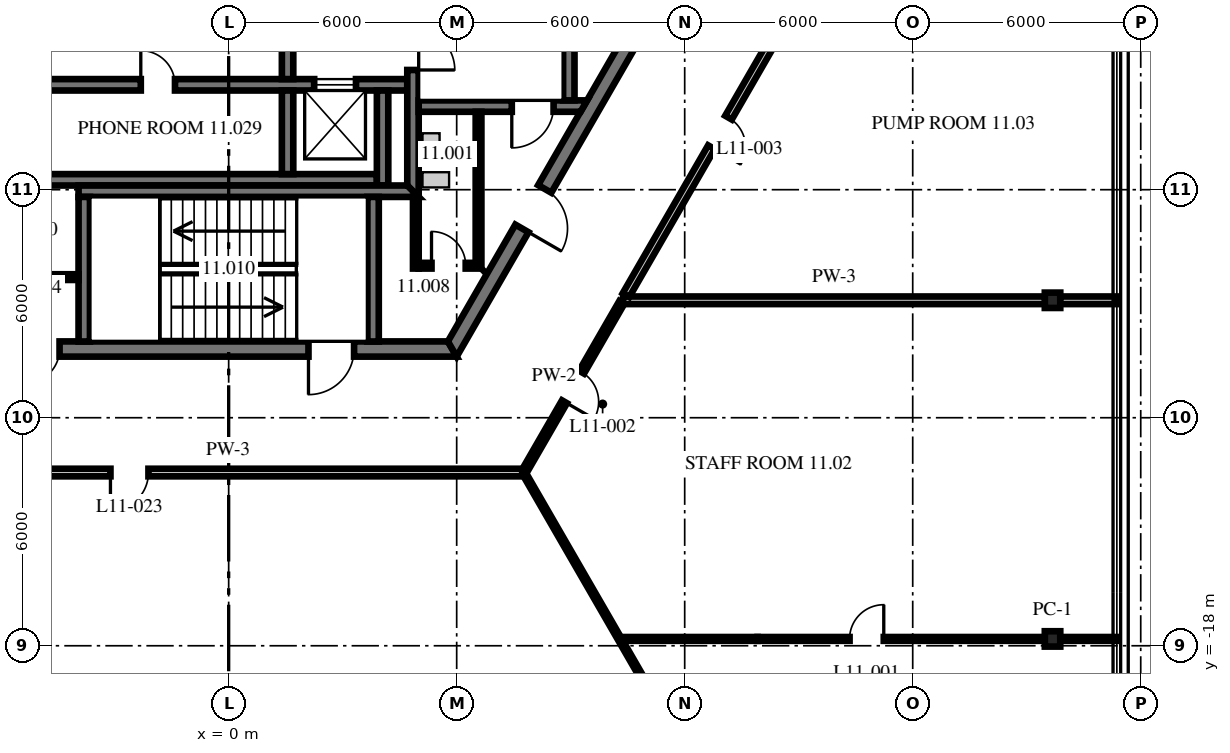
"""IFC4 building model, lengths in metres.
Left out: names, types, materials, properties, quantities, classifications, styles, units other than length and angle.
Written with IfcOpenShell. Run it as: python <this file> out.ifc"""

import sys

from ifc_helpers import new_model, si_unit, direction, frame, frame_2d, origin, origin_2d, place, context, subcontext, project, spatial, polyline, rectangle, i_section, outline, extrude, source, transform, mapped, element, fill, save


model = new_model("IFC4")
c1 = context("Model", 3, precision=1e-05, world=origin(), true_north=direction((0.0, 1.0)))
c2 = subcontext(c1, "Body", "Model", "MODEL_VIEW")
j1 = project(units=[si_unit("LENGTHUNIT", "METRE"), si_unit("PLANEANGLEUNIT", "RADIAN")], contexts=[c1])
p1 = place(None, origin())
s1 = spatial("IfcSite", under=j1, at=p1, CompositionType="ELEMENT")
p2 = place(p1, origin())
s2 = spatial("IfcBuilding", under=s1, at=p2, CompositionType="ELEMENT")
p3 = place(p2, frame((0.0, 0.0, 50.4)))
s3 = spatial("IfcBuildingStorey", under=s2, at=p3, CompositionType="ELEMENT", Elevation=50.4)
m1 = source(origin(), c2, "Body", "SweptSolid", [
    extrude(i_section(OverallWidth=0.404, OverallDepth=0.406, WebThickness=0.027, FlangeThickness=0.044, at=origin_2d()), origin(), (0.0, 0.0, 1.0), 3.15),
])
for number, where, z_axis, x_axis in (
    (1, (21.679, -17.82, 0.0), (0.0, 0.0, 1.0), (0.0, 1.0, 0.0)),
    (2, (21.679, -8.91, 0.0), (0.0, 0.0, 1.0), (0.0, 1.0, 0.0)),
):
    element("IfcColumn", number, at=place(p3, frame(where, z_axis=z_axis, x_axis=x_axis)), inside=s3, PredefinedType="COLUMN", context=c2, shape_type="MappedRepresentation", body=[
        mapped(m1, transform((0.0, 0.0, 0.0), scale=1.0)),
    ])
m2 = source(origin(), c2, "Body", "SweptSolid", [
    extrude(outline(polyline([(-0.115, -0.2), (11.885, -0.2), (11.654, 0.2), (0.115, 0.2), (-0.115, -0.2)])), origin(), (0.0, 0.0, 1.0), 4.05),
])
p4 = place(p3, frame((-5.885, -10.192, 0.0), z_axis=(0.0, 0.0, 1.0), x_axis=(1.0, 0.0, 0.0)))
e3 = element("IfcWall", 3, at=p4, inside=s3, PredefinedType="SHEAR", context=c2, shape_type="MappedRepresentation", body=[
    mapped(m2, transform((0.0, 0.0, 0.0), scale=1.0)),
])
p5 = place(p4, frame((7.985, 0.0, 0.0)))
e4 = element("IfcOpeningElement", 4, at=p5, cuts=e3, PredefinedType="OPENING", context=c2, shape_type="SweptSolid", body=[
    extrude(rectangle(XDim=1.2, YDim=2.1, at=frame_2d((0.6, 1.05))), frame((0.0, 0.21, 0.0), z_axis=(0.0, -1.0, 0.0), x_axis=(1.0, 0.0, 0.0)), (0.0, 0.0, 1.0), 0.42),
])
p6 = place(p4, frame((0.534, 0.0, 0.0)))
e5 = element("IfcOpeningElement", 5, at=p6, cuts=e3, PredefinedType="OPENING", context=c2, shape_type="SweptSolid", body=[
    extrude(rectangle(XDim=0.9, YDim=2.1, at=frame_2d((0.45, 1.05))), frame((0.0, 0.21, 0.0), z_axis=(0.0, -1.0, 0.0), x_axis=(1.0, 0.0, 0.0)), (0.0, 0.0, 1.0), 0.42),
])
p7 = place(p3, frame((5.885, -10.192, 0.0), z_axis=(0.0, 0.0, 1.0), x_axis=(0.499996592174, 0.866027371285, 0.0)))
e6 = element("IfcWall", 6, at=p7, inside=s3, PredefinedType="SHEAR", context=c2, shape_type="MappedRepresentation", body=[
    mapped(m2, transform((0.0, 0.0, 0.0), scale=1.0)),
])
p8 = place(p7, frame((3.665, 0.0, 0.0)))
e7 = element("IfcOpeningElement", 7, at=p8, cuts=e6, PredefinedType="OPENING", context=c2, shape_type="SweptSolid", body=[
    extrude(rectangle(XDim=1.2, YDim=2.1, at=frame_2d((0.6, 1.05))), frame((0.0, 0.21, 0.0), z_axis=(0.0, -1.0, 0.0), x_axis=(1.0, 0.0, 0.0)), (0.0, 0.0, 1.0), 0.42),
])
p9 = place(p3, frame((-8.1, -3.24, 0.0), z_axis=(0.0, 0.0, 1.0), x_axis=(1.0, 0.0, 0.0)))
e8 = element("IfcWall", 8, at=p9, inside=s3, PredefinedType="SHEAR", context=c2, shape_type="SweptSolid", body=[
    extrude(rectangle(XDim=12.8, YDim=0.3, at=frame_2d((6.4, 0.0))), origin(), (0.0, 0.0, 1.0), 4.05),
])
p10 = place(p9, frame((1.113, 0.0, 0.0)))
e9 = element("IfcOpeningElement", 9, at=p10, cuts=e8, PredefinedType="OPENING", context=c2, shape_type="SweptSolid", body=[
    extrude(rectangle(XDim=0.9, YDim=2.1, at=frame_2d((0.45, 1.05))), frame((0.0, 0.16, 0.0), z_axis=(0.0, -1.0, 0.0), x_axis=(1.0, 0.0, 0.0)), (0.0, 0.0, 1.0), 0.32),
])
p11 = place(p9, frame((5.788, 0.0, 0.0)))
e10 = element("IfcOpeningElement", 10, at=p11, cuts=e8, PredefinedType="OPENING", context=c2, shape_type="SweptSolid", body=[
    extrude(rectangle(XDim=0.9, YDim=2.1, at=frame_2d((0.45, 1.05))), frame((0.0, 0.16, 0.0), z_axis=(0.0, -1.0, 0.0), x_axis=(1.0, 0.0, 0.0)), (0.0, 0.0, 1.0), 0.32),
])
p12 = place(p9, frame((10.35, 0.0, 0.0)))
e11 = element("IfcOpeningElement", 11, at=p12, cuts=e8, PredefinedType="OPENING", context=c2, shape_type="SweptSolid", body=[
    extrude(rectangle(XDim=1.1, YDim=2.1, at=frame_2d((0.55, 1.05))), frame((0.0, 0.16, 0.0), z_axis=(0.0, -1.0, 0.0), x_axis=(1.0, 0.0, 0.0)), (0.0, 0.0, 1.0), 0.32),
])
p13 = place(p3, frame((-8.1, -5.74, 0.0), z_axis=(0.0, 0.0, 1.0), x_axis=(1.0, 0.0, 0.0)))
e12 = element("IfcWall", 12, at=p13, inside=s3, PredefinedType="SHEAR", context=c2, shape_type="SweptSolid", body=[
    extrude(outline(polyline([(12.0, -0.15), (-0.04, -0.15), (-0.213, 0.15), (12.0, 0.15), (12.0, -0.15)])), origin(), (0.0, 0.0, 1.0), 4.05),
])
m3 = source(origin(), c2, "Body", "SweptSolid", [
    extrude(rectangle(XDim=2.2, YDim=0.3, at=frame_2d((1.1, 0.0))), origin(), (0.0, 0.0, 1.0), 4.05),
])
p14 = place(p3, frame((1.55, -5.59, 0.0), z_axis=(0.0, 0.0, 1.0), x_axis=(0.0, 1.0, 0.0)))
e13 = element("IfcWall", 13, at=p14, inside=s3, PredefinedType="SHEAR", context=c2, shape_type="MappedRepresentation", body=[
    mapped(m3, transform((0.0, 0.0, 0.0), scale=1.0)),
])
m4 = source(origin(), c2, "Body", "SweptSolid", [
    extrude(rectangle(XDim=2.5, YDim=0.3, at=frame_2d((1.25, 0.0))), origin(), (0.0, 0.0, 1.0), 4.05),
])
p15 = place(p3, frame((4.05, -5.89, 0.0), z_axis=(0.0, 0.0, 1.0), x_axis=(0.0, 1.0, 0.0)))
e14 = element("IfcWall", 14, at=p15, inside=s3, PredefinedType="SHEAR", context=c2, shape_type="MappedRepresentation", body=[
    mapped(m4, transform((0.0, 0.0, 0.0), scale=1.0)),
])
m5 = source(origin(), c2, "Body", "SweptSolid", [
    extrude(rectangle(XDim=3.0, YDim=0.3, at=frame_2d((1.5, 0.0))), origin(), (0.0, 0.0, 1.0), 4.05),
])
p16 = place(p3, frame((1.55, -3.09, 0.0), z_axis=(0.0, 0.0, 1.0), x_axis=(0.0, 1.0, 0.0)))
e15 = element("IfcWall", 15, at=p16, inside=s3, PredefinedType="SHEAR", context=c2, shape_type="MappedRepresentation", body=[
    mapped(m5, transform((0.0, 0.0, 0.0), scale=1.0)),
])
p17 = place(p16, frame((0.9, 0.0, 0.0)))
e16 = element("IfcOpeningElement", 16, at=p17, cuts=e15, PredefinedType="OPENING", context=c2, shape_type="SweptSolid", body=[
    extrude(rectangle(XDim=1.2, YDim=2.1, at=frame_2d((0.6, 1.05))), frame((0.0, 0.16, 0.0), z_axis=(0.0, -1.0, 0.0), x_axis=(1.0, 0.0, 0.0)), (0.0, 0.0, 1.0), 0.32),
])
p18 = place(p3, frame((4.85, -6.04, 0.0), z_axis=(0.0, 0.0, 1.0), x_axis=(0.0, 1.0, 0.0)))
e17 = element("IfcWall", 17, at=p18, inside=s3, PredefinedType="SHEAR", context=c2, shape_type="SweptSolid", body=[
    extrude(outline(polyline([(-0.15, -0.15), (9.99, -0.15), (9.99, 0.15), (0.15, 0.15), (-0.15, -0.15)])), origin(), (0.0, 0.0, 1.0), 4.05),
])
p19 = place(p18, frame((3.19, 0.0, 0.0)))
e18 = element("IfcOpeningElement", 18, at=p19, cuts=e17, PredefinedType="OPENING", context=c2, shape_type="SweptSolid", body=[
    extrude(rectangle(XDim=1.1, YDim=2.1, at=frame_2d((0.55, 1.05))), frame((0.0, 0.16, 0.0), z_axis=(0.0, -1.0, 0.0), x_axis=(1.0, 0.0, 0.0)), (0.0, 0.0, 1.0), 0.32),
])
p20 = place(p3, frame((5.0, -3.8, 0.0), z_axis=(0.0, 0.0, 1.0), x_axis=(1.0, 0.0, 0.0)))
e19 = element("IfcWall", 19, at=p20, inside=s3, PredefinedType="SHEAR", context=c2, shape_type="SweptSolid", body=[
    extrude(outline(polyline([(0.0, -0.15), (0.0, 0.15), (4.433, 0.15), (4.26, -0.15), (0.0, -0.15)])), origin(), (0.0, 0.0, 1.0), 4.05),
])
p21 = place(p20, frame((2.45, 0.0, 0.0)))
e20 = element("IfcOpeningElement", 20, at=p21, cuts=e19, PredefinedType="OPENING", context=c2, shape_type="SweptSolid", body=[
    extrude(rectangle(XDim=1.1, YDim=2.1, at=frame_2d((0.55, 1.05))), frame((0.0, 0.16, 0.0), z_axis=(0.0, -1.0, 0.0), x_axis=(1.0, 0.0, 0.0)), (0.0, 0.0, 1.0), 0.32),
])
p22 = place(p3, frame((8.95, -3.65, 0.0), z_axis=(0.0, 0.0, 1.0), x_axis=(0.0, 1.0, 0.0)))
e21 = element("IfcWall", 21, at=p22, inside=s3, PredefinedType="SHEAR", context=c2, shape_type="SweptSolid", body=[
    extrude(rectangle(XDim=7.3, YDim=0.3, at=frame_2d((3.65, 0.0))), origin(), (0.0, 0.0, 1.0), 4.05),
])
p23 = place(p3, frame((-3.95, -6.04, 0.0), z_axis=(0.0, 0.0, 1.0), x_axis=(1.0, 0.0, 0.0)))
e22 = element("IfcWall", 22, at=p23, inside=s3, PredefinedType="SHEAR", context=c2, shape_type="SweptSolid", body=[
    extrude(outline(polyline([(0.0, -0.15), (8.95, -0.15), (8.65, 0.15), (0.0, 0.15), (0.0, -0.15)])), origin(), (0.0, 0.0, 1.0), 4.05),
])
m6 = source(origin(), c2, "Body", "SweptSolid", [
    extrude(outline(polyline([(3.8, -0.15), (-0.004, -0.15), (-0.004, 0.15), (3.8, 0.15), (3.8, -0.15)])), origin(), (0.0, 0.0, 1.0), 4.05),
])
for number, where, z_axis, x_axis in (
    (23, (-3.8, -9.99, 0.0), (0.0, 0.0, 1.0), (0.0, 1.0, 0.0)),
    (24, (3.8, -9.99, 0.0), (0.0, 0.0, 1.0), (0.0, 1.0, 0.0)),
):
    element("IfcWall", number, at=place(p3, frame(where, z_axis=z_axis, x_axis=x_axis)), inside=s3, PredefinedType="SHEAR", context=c2, shape_type="MappedRepresentation", body=[
        mapped(m6, transform((0.0, 0.0, 0.0), scale=1.0)),
    ])
p24 = place(p3, frame((-6.727, -8.3, 0.0), z_axis=(0.0, 0.0, 1.0), x_axis=(1.0, 0.0, 0.0)))
e25 = element("IfcWall", 25, at=p24, inside=s3, PredefinedType="PARTITIONING", context=c2, shape_type="SweptSolid", body=[
    extrude(rectangle(XDim=2.777, YDim=0.15, at=frame_2d((1.389, 0.0))), origin(), (0.0, 0.0, 1.0), 4.05),
])
p25 = place(p3, frame((5.0, -8.0, 0.0), z_axis=(0.0, 0.0, 1.0), x_axis=(1.0, 0.0, 0.0)))
e26 = element("IfcWall", 26, at=p25, inside=s3, PredefinedType="PARTITIONING", context=c2, shape_type="SweptSolid", body=[
    extrude(outline(polyline([(0.0, -0.075), (1.65, -0.075), (1.5, 0.075), (0.0, 0.075), (0.0, -0.075)])), origin(), (0.0, 0.0, 1.0), 4.05),
])
p26 = place(p25, frame((0.337, 0.0, 0.0)))
e27 = element("IfcOpeningElement", 27, at=p26, cuts=e26, PredefinedType="OPENING", context=c2, shape_type="SweptSolid", body=[
    extrude(rectangle(XDim=0.9, YDim=2.1, at=frame_2d((0.45, 1.05))), frame((0.0, 0.085, 0.0), z_axis=(0.0, -1.0, 0.0), x_axis=(1.0, 0.0, 0.0)), (0.0, 0.0, 1.0), 0.17),
])
p27 = place(p3, frame((6.575, -8.0, 0.0), z_axis=(0.0, 0.0, 1.0), x_axis=(0.0, 1.0, 0.0)))
e28 = element("IfcWall", 28, at=p27, inside=s3, PredefinedType="PARTITIONING", context=c2, shape_type="SweptSolid", body=[
    extrude(outline(polyline([(-0.075, -0.075), (4.05, -0.075), (4.05, 0.075), (0.075, 0.075), (-0.075, -0.075)])), origin(), (0.0, 0.0, 1.0), 4.05),
])
p28 = place(p3, frame((4.925, -8.075, 0.0), z_axis=(0.0, 0.0, 1.0), x_axis=(0.0, 1.0, 0.0)))
e29 = element("IfcWall", 29, at=p28, inside=s3, PredefinedType="PARTITIONING", context=c2, shape_type="SweptSolid", body=[
    extrude(rectangle(XDim=1.885, YDim=0.15, at=frame_2d((0.942, 0.0))), origin(), (0.0, 0.0, 1.0), 4.05),
])
p29 = place(p3, frame((7.761, -13.442, 0.0), z_axis=(0.0, 0.0, 1.0), x_axis=(0.499995773473, -0.866027843957, 0.0)))
e30 = element("IfcWall", 30, at=p29, inside=s3, PredefinedType="PARTITIONING", context=c2, shape_type="SweptSolid", body=[
    extrude(rectangle(XDim=18.274, YDim=0.1, at=frame_2d((9.137, 0.0))), origin(), (0.0, 0.0, 1.0), 4.05),
])
p30 = place(p3, frame((10.348, -17.82, 0.0), z_axis=(0.0, 0.0, 1.0), x_axis=(1.0, 0.0, 0.0)))
e31 = element("IfcWall", 31, at=p30, inside=s3, PredefinedType="PARTITIONING", context=c2, shape_type="SweptSolid", body=[
    extrude(rectangle(XDim=3.57, YDim=0.1, at=frame_2d((1.785, 0.0))), origin(), (0.0, 0.0, 1.0), 4.05),
])
m7 = source(origin(), c2, "Body", "SweptSolid", [
    extrude(rectangle(XDim=7.568, YDim=0.1, at=frame_2d((3.784, 0.0))), origin(), (0.0, 0.0, 1.0), 3.514),
])
p31 = place(p3, frame((13.918, -17.82, 0.0), z_axis=(0.0, 0.0, 1.0), x_axis=(1.0, 0.0, 0.0)))
e32 = element("IfcWall", 32, at=p31, inside=s3, PredefinedType="PARTITIONING", context=c2, shape_type="MappedRepresentation", body=[
    mapped(m7, transform((0.0, 0.0, 0.0), scale=1.0)),
])
p32 = place(p31, frame((2.42, 0.0, 0.0)))
e33 = element("IfcOpeningElement", 33, at=p32, cuts=e32, PredefinedType="OPENING", context=c2, shape_type="SweptSolid", body=[
    extrude(rectangle(XDim=0.9, YDim=2.1, at=frame_2d((0.45, 1.05))), frame((0.0, 0.06, 0.0), z_axis=(0.0, -1.0, 0.0), x_axis=(1.0, 0.0, 0.0)), (0.0, 0.0, 1.0), 0.12),
])
m8 = source(origin(), c2, "Body", "SweptSolid", [
    extrude(rectangle(XDim=1.499, YDim=0.1, at=frame_2d((0.749, 0.0))), origin(), (0.0, 0.0, 1.0), 4.05),
])
p33 = place(p3, frame((21.873, -17.82, 0.0), z_axis=(0.0, 0.0, 1.0), x_axis=(1.0, 0.0, 0.0)))
e34 = element("IfcWall", 34, at=p33, inside=s3, PredefinedType="PARTITIONING", context=c2, shape_type="MappedRepresentation", body=[
    mapped(m8, transform((0.0, 0.0, 0.0), scale=1.0)),
])
p34 = place(p3, frame((-7.761, -13.442, 0.0), z_axis=(0.0, 0.0, 1.0), x_axis=(1.0, 0.0, 0.0)))
e35 = element("IfcWall", 35, at=p34, inside=s3, PredefinedType="PARTITIONING", context=c2, shape_type="SweptSolid", body=[
    extrude(rectangle(XDim=15.492, YDim=0.2, at=frame_2d((7.746, 0.0))), origin(), (0.0, 0.0, 1.0), 4.05),
])
p35 = place(p34, frame((4.65, 0.0, 0.0)))
e36 = element("IfcOpeningElement", 36, at=p35, cuts=e35, PredefinedType="OPENING", context=c2, shape_type="SweptSolid", body=[
    extrude(rectangle(XDim=1.0, YDim=2.1, at=frame_2d((0.5, 1.05))), frame((0.0, 0.11, 0.0), z_axis=(0.0, -1.0, 0.0), x_axis=(1.0, 0.0, 0.0)), (0.0, 0.0, 1.0), 0.22),
])
m9 = source(origin(), c2, "Body", "SweptSolid", [
    extrude(rectangle(XDim=11.109, YDim=0.2, at=frame_2d((5.554, 0.0))), origin(), (0.0, 0.0, 1.0), 3.293),
])
p36 = place(p3, frame((10.378, -8.91, 0.0), z_axis=(0.0, 0.0, 1.0), x_axis=(1.0, 0.0, 0.0)))
e37 = element("IfcWall", 37, at=p36, inside=s3, PredefinedType="PARTITIONING", context=c2, shape_type="MappedRepresentation", body=[
    mapped(m9, transform((0.0, 0.0, 0.0), scale=1.0)),
])
m10 = source(origin(), c2, "Body", "SweptSolid", [
    extrude(rectangle(XDim=1.499, YDim=0.2, at=frame_2d((0.749, 0.0))), origin(), (0.0, 0.0, 1.0), 4.05),
])
p37 = place(p3, frame((21.873, -8.91, 0.0), z_axis=(0.0, 0.0, 1.0), x_axis=(1.0, 0.0, 0.0)))
e38 = element("IfcWall", 38, at=p37, inside=s3, PredefinedType="PARTITIONING", context=c2, shape_type="MappedRepresentation", body=[
    mapped(m10, transform((0.0, 0.0, 0.0), scale=1.0)),
])
p38 = place(p3, frame((7.776, -13.416, 0.0), z_axis=(0.0, 0.0, 1.0), x_axis=(0.50002671436, 0.866009979692, 0.0)))
e39 = element("IfcWall", 39, at=p38, inside=s3, PredefinedType="PARTITIONING", context=c2, shape_type="SweptSolid", body=[
    extrude(rectangle(XDim=5.14, YDim=0.15, at=frame_2d((2.57, 0.0))), origin(), (0.0, 0.0, 1.0), 4.05),
])
p39 = place(p38, frame((2.12, 0.0, 0.0)))
e40 = element("IfcOpeningElement", 40, at=p39, cuts=e39, PredefinedType="OPENING", context=c2, shape_type="SweptSolid", body=[
    extrude(rectangle(XDim=0.9, YDim=2.1, at=frame_2d((0.45, 1.05))), frame((0.0, 0.085, 0.0), z_axis=(0.0, -1.0, 0.0), x_axis=(1.0, 0.0, 0.0)), (0.0, 0.0, 1.0), 0.17),
])
p40 = place(p3, frame((10.456, -8.774, 0.0), z_axis=(0.0, 0.0, 1.0), x_axis=(0.500000566121, 0.866025076934, 0.0)))
e41 = element("IfcWall", 41, at=p40, inside=s3, PredefinedType="PARTITIONING", context=c2, shape_type="SweptSolid", body=[
    extrude(rectangle(XDim=10.132, YDim=0.2, at=frame_2d((5.066, 0.0))), origin(), (0.0, 0.0, 1.0), 4.05),
])
p41 = place(p40, frame((4.493, 0.0, 0.0)))
e42 = element("IfcOpeningElement", 42, at=p41, cuts=e41, PredefinedType="OPENING", context=c2, shape_type="SweptSolid", body=[
    extrude(rectangle(XDim=0.9, YDim=2.1, at=frame_2d((0.45, 1.05))), frame((0.0, 0.11, 0.0), z_axis=(0.0, -1.0, 0.0), x_axis=(1.0, 0.0, 0.0)), (0.0, 0.0, 1.0), 0.22),
])
p42 = place(p5, frame((1.2, 0.0, 0.0), z_axis=(0.0, 0.0, 1.0), x_axis=(-1.0, 0.0, 0.0)))
e43 = element("IfcDoor", 43, at=p42, inside=s3, OperationType="SINGLE_SWING_RIGHT", PredefinedType="DOOR", context=c2, shape_type="SweptSolid", body=[
    extrude(rectangle(XDim=1.2, YDim=2.1, at=frame_2d((0.6, 1.05))), frame((0.0, 0.025, 0.0), z_axis=(0.0, -1.0, 0.0), x_axis=(1.0, 0.0, 0.0)), (0.0, 0.0, 1.0), 0.05),
])
fill(e4, e43)
p43 = place(p8, frame((1.2, 0.0, 0.0), z_axis=(0.0, 0.0, 1.0), x_axis=(-1.0, 0.0, 0.0)))
e44 = element("IfcDoor", 44, at=p43, inside=s3, OperationType="SINGLE_SWING_RIGHT", PredefinedType="DOOR", context=c2, shape_type="SweptSolid", body=[
    extrude(rectangle(XDim=1.2, YDim=2.1, at=frame_2d((0.6, 1.05))), frame((0.0, 0.025, 0.0), z_axis=(0.0, -1.0, 0.0), x_axis=(1.0, 0.0, 0.0)), (0.0, 0.0, 1.0), 0.05),
])
fill(e7, e44)
p44 = place(p19, frame((1.1, 0.0, 0.0), z_axis=(0.0, 0.0, 1.0), x_axis=(-1.0, 0.0, 0.0)))
e45 = element("IfcDoor", 45, at=p44, inside=s3, OperationType="SINGLE_SWING_RIGHT", PredefinedType="DOOR", context=c2, shape_type="SweptSolid", body=[
    extrude(rectangle(XDim=1.1, YDim=2.1, at=frame_2d((0.55, 1.05))), frame((0.0, 0.025, 0.0), z_axis=(0.0, -1.0, 0.0), x_axis=(1.0, 0.0, 0.0)), (0.0, 0.0, 1.0), 0.05),
])
fill(e18, e45)
p45 = place(p21, frame((1.1, 0.0, 0.0), z_axis=(0.0, 0.0, 1.0), x_axis=(-1.0, 0.0, 0.0)))
e46 = element("IfcDoor", 46, at=p45, inside=s3, OperationType="SINGLE_SWING_RIGHT", PredefinedType="DOOR", context=c2, shape_type="SweptSolid", body=[
    extrude(rectangle(XDim=1.1, YDim=2.1, at=frame_2d((0.55, 1.05))), frame((0.0, 0.025, 0.0), z_axis=(0.0, -1.0, 0.0), x_axis=(1.0, 0.0, 0.0)), (0.0, 0.0, 1.0), 0.05),
])
fill(e20, e46)
p46 = place(p11, origin())
e47 = element("IfcDoor", 47, at=p46, inside=s3, OperationType="SINGLE_SWING_LEFT", PredefinedType="DOOR", context=c2, shape_type="SweptSolid", body=[
    extrude(rectangle(XDim=0.9, YDim=2.1, at=frame_2d((0.45, 1.05))), frame((0.0, 0.025, 0.0), z_axis=(0.0, -1.0, 0.0), x_axis=(1.0, 0.0, 0.0)), (0.0, 0.0, 1.0), 0.05),
])
fill(e10, e47)
p47 = place(p6, frame((0.9, 0.0, 0.0), z_axis=(0.0, 0.0, 1.0), x_axis=(-1.0, 0.0, 0.0)))
e48 = element("IfcDoor", 48, at=p47, inside=s3, OperationType="SINGLE_SWING_RIGHT", PredefinedType="DOOR", context=c2, shape_type="SweptSolid", body=[
    extrude(rectangle(XDim=0.9, YDim=2.1, at=frame_2d((0.45, 1.05))), frame((0.0, 0.025, 0.0), z_axis=(0.0, -1.0, 0.0), x_axis=(1.0, 0.0, 0.0)), (0.0, 0.0, 1.0), 0.05),
])
fill(e5, e48)
p48 = place(p26, origin())
e49 = element("IfcDoor", 49, at=p48, inside=s3, OperationType="SINGLE_SWING_LEFT", PredefinedType="DOOR", context=c2, shape_type="SweptSolid", body=[
    extrude(rectangle(XDim=0.9, YDim=2.1, at=frame_2d((0.45, 1.05))), frame((0.0, 0.025, 0.0), z_axis=(0.0, -1.0, 0.0), x_axis=(1.0, 0.0, 0.0)), (0.0, 0.0, 1.0), 0.05),
])
fill(e27, e49)
p49 = place(p12, origin())
e50 = element("IfcDoor", 50, at=p49, inside=s3, OperationType="DOUBLE_DOOR_SLIDING", PredefinedType="DOOR", context=c2, shape_type="SweptSolid", body=[
    extrude(rectangle(XDim=1.1, YDim=2.1, at=frame_2d((0.55, 1.05))), frame((0.0, 0.025, 0.0), z_axis=(0.0, -1.0, 0.0), x_axis=(1.0, 0.0, 0.0)), (0.0, 0.0, 1.0), 0.05),
])
fill(e11, e50)
p50 = place(p32, origin())
e51 = element("IfcDoor", 51, at=p50, inside=s3, OperationType="SINGLE_SWING_LEFT", PredefinedType="DOOR", context=c2, shape_type="SweptSolid", body=[
    extrude(rectangle(XDim=0.9, YDim=2.1, at=frame_2d((0.45, 1.05))), frame((0.0, 0.025, 0.0), z_axis=(0.0, -1.0, 0.0), x_axis=(1.0, 0.0, 0.0)), (0.0, 0.0, 1.0), 0.05),
])
fill(e33, e51)
p51 = place(p39, origin())
e52 = element("IfcDoor", 52, at=p51, inside=s3, OperationType="SINGLE_SWING_RIGHT", PredefinedType="DOOR", context=c2, shape_type="SweptSolid", body=[
    extrude(rectangle(XDim=0.9, YDim=2.1, at=frame_2d((0.45, 1.05))), frame((0.0, 0.025, 0.0), z_axis=(0.0, -1.0, 0.0), x_axis=(1.0, 0.0, 0.0)), (0.0, 0.0, 1.0), 0.05),
])
fill(e40, e52)
p52 = place(p41, origin())
e53 = element("IfcDoor", 53, at=p52, inside=s3, OperationType="SINGLE_SWING_RIGHT", PredefinedType="DOOR", context=c2, shape_type="SweptSolid", body=[
    extrude(rectangle(XDim=0.9, YDim=2.1, at=frame_2d((0.45, 1.05))), frame((0.0, 0.025, 0.0), z_axis=(0.0, -1.0, 0.0), x_axis=(1.0, 0.0, 0.0)), (0.0, 0.0, 1.0), 0.05),
])
fill(e42, e53)
p53 = place(p35, origin())
e54 = element("IfcDoor", 54, at=p53, inside=s3, OperationType="SINGLE_SWING_RIGHT", PredefinedType="DOOR", context=c2, shape_type="SweptSolid", body=[
    extrude(rectangle(XDim=1.0, YDim=2.1, at=frame_2d((0.5, 1.05))), frame((0.0, 0.025, 0.0), z_axis=(0.0, -1.0, 0.0), x_axis=(1.0, 0.0, 0.0)), (0.0, 0.0, 1.0), 0.05),
])
fill(e36, e54)
save(model, sys.argv[1])
